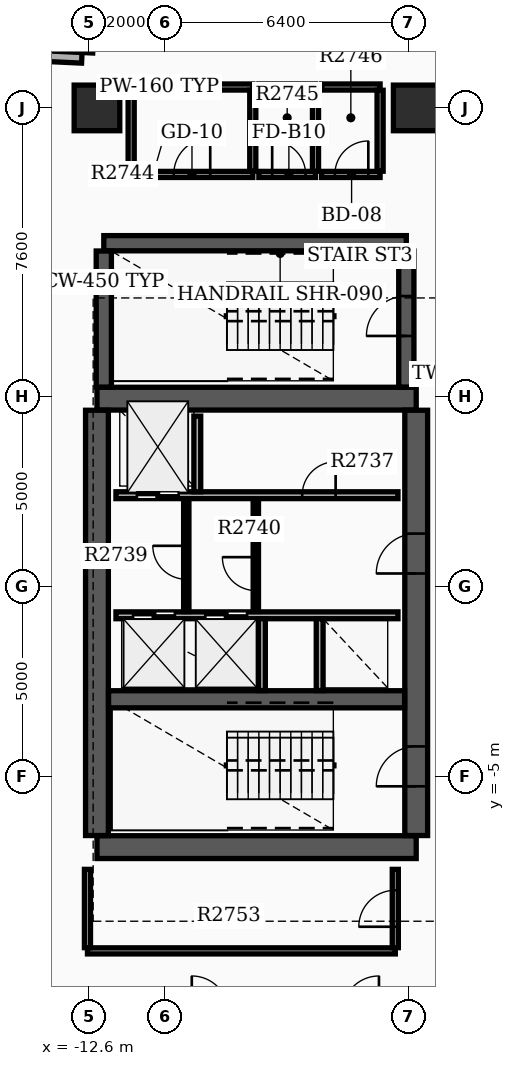
"""IFC4 building model, lengths in metres.
Left out: names, types, materials, properties, quantities, classifications, styles, units other than length and angle.
Written with IfcOpenShell. Run it as: python <this file> out.ifc"""

import sys

from ifc_helpers import new_model, si_unit, direction, frame, frame_2d, origin, origin_2d, place, context, subcontext, project, spatial, rectangle, extrude, element, fill, save


model = new_model("IFC4")
c1 = context("Model", 3, precision=1e-05, world=origin(), true_north=direction((0.0, 1.0)))
c2 = subcontext(c1, "Body", "Model", "MODEL_VIEW")
j1 = project(units=[si_unit("LENGTHUNIT", "METRE"), si_unit("PLANEANGLEUNIT", "RADIAN")], contexts=[c1])
p1 = place(None, origin())
s1 = spatial("IfcSite", under=j1, at=p1, CompositionType="ELEMENT")
p2 = place(p1, origin())
s2 = spatial("IfcBuilding", under=s1, at=p2, CompositionType="ELEMENT")
p3 = place(p2, frame((0.0, 0.0, 172.2)))
s3 = spatial("IfcBuildingStorey", under=s2, at=p3, CompositionType="ELEMENT", Elevation=172.2)
for number, where, z_axis, x_axis in (
    (1, (-12.4, -6.85, 0.0), (0.0, 0.0, 1.0), (1.0, 0.0, 0.0)),
    (2, (-12.4, 4.95, 0.0), (0.0, 0.0, 1.0), (1.0, 0.0, 0.0)),
):
    element("IfcWall", number, at=place(p3, frame(where, z_axis=z_axis, x_axis=x_axis)), inside=s3, PredefinedType="SHEAR", context=c2, shape_type="SweptSolid", body=[
        extrude(rectangle(XDim=8.4, YDim=0.6, at=frame_2d((4.2, 0.0))), origin(), (0.0, 0.0, 1.0), 3.7),
    ])
p4 = place(p3, frame((-12.4, -6.545, 0.0), z_axis=(0.0, 0.0, 1.0), x_axis=(0.0, 1.0, 0.0)))
e3 = element("IfcWall", 3, at=p4, inside=s3, PredefinedType="SHEAR", context=c2, shape_type="SweptSolid", body=[
    extrude(rectangle(XDim=11.19, YDim=0.6, at=frame_2d((5.595, 0.0))), origin(), (0.0, 0.0, 1.0), 3.7),
])
p5 = place(p3, frame((-4.0, -6.545, 0.0), z_axis=(0.0, 0.0, 1.0), x_axis=(0.0, 1.0, 0.0)))
e4 = element("IfcWall", 4, at=p5, inside=s3, PredefinedType="SHEAR", context=c2, shape_type="SweptSolid", body=[
    extrude(rectangle(XDim=11.19, YDim=0.6, at=frame_2d((5.595, 0.0))), origin(), (0.0, 0.0, 1.0), 3.7),
])
p6 = place(p5, frame((1.295, 0.0, 0.0)))
e5 = element("IfcOpeningElement", 5, at=p6, cuts=e4, PredefinedType="OPENING", context=c2, shape_type="SweptSolid", body=[
    extrude(rectangle(XDim=1.05, YDim=2.15, at=frame_2d((0.525, 1.075))), frame((0.0, 0.31, 0.0), z_axis=(0.0, -1.0, 0.0), x_axis=(1.0, 0.0, 0.0)), (0.0, 0.0, 1.0), 0.62),
])
p7 = place(p5, frame((6.895, 0.0, 0.0)))
e6 = element("IfcOpeningElement", 6, at=p7, cuts=e4, PredefinedType="OPENING", context=c2, shape_type="SweptSolid", body=[
    extrude(rectangle(XDim=1.05, YDim=2.15, at=frame_2d((0.525, 1.075))), frame((0.0, 0.31, 0.0), z_axis=(0.0, -1.0, 0.0), x_axis=(1.0, 0.0, 0.0)), (0.0, 0.0, 1.0), 0.62),
])
p8 = place(p3, frame((-12.095, -2.96, 0.0), z_axis=(0.0, 0.0, 1.0), x_axis=(1.0, 0.0, 0.0)))
e7 = element("IfcWall", 7, at=p8, inside=s3, PredefinedType="SHEAR", context=c2, shape_type="SweptSolid", body=[
    extrude(rectangle(XDim=7.79, YDim=0.45, at=frame_2d((3.895, 0.0))), origin(), (0.0, 0.0, 1.0), 3.7),
])
p9 = place(p3, frame((-12.22, 9.04, 0.0), z_axis=(0.0, 0.0, 1.0), x_axis=(1.0, 0.0, 0.0)))
e8 = element("IfcWall", 8, at=p9, inside=s3, PredefinedType="SHEAR", context=c2, shape_type="SweptSolid", body=[
    extrude(rectangle(XDim=7.96, YDim=0.4, at=frame_2d((3.98, 0.0))), origin(), (0.0, 0.0, 1.0), 3.7),
])
p10 = place(p3, frame((-12.22, 5.255, 0.0), z_axis=(0.0, 0.0, 1.0), x_axis=(0.0, 1.0, 0.0)))
e9 = element("IfcWall", 9, at=p10, inside=s3, PredefinedType="SHEAR", context=c2, shape_type="SweptSolid", body=[
    extrude(rectangle(XDim=3.58, YDim=0.4, at=frame_2d((1.79, 0.0))), origin(), (0.0, 0.0, 1.0), 3.7),
])
p11 = place(p3, frame((-4.26, 5.255, 0.0), z_axis=(0.0, 0.0, 1.0), x_axis=(0.0, 1.0, 0.0)))
e10 = element("IfcWall", 10, at=p11, inside=s3, PredefinedType="SHEAR", context=c2, shape_type="SweptSolid", body=[
    extrude(rectangle(XDim=3.58, YDim=0.4, at=frame_2d((1.79, 0.0))), origin(), (0.0, 0.0, 1.0), 3.7),
])
p12 = place(p11, frame((1.345, 0.0, 0.0)))
e11 = element("IfcOpeningElement", 11, at=p12, cuts=e10, PredefinedType="OPENING", context=c2, shape_type="SweptSolid", body=[
    extrude(rectangle(XDim=1.05, YDim=2.15, at=frame_2d((0.525, 1.075))), frame((0.0, 0.21, 0.0), z_axis=(0.0, -1.0, 0.0), x_axis=(1.0, 0.0, 0.0)), (0.0, 0.0, 1.0), 0.42),
])
for number, where, z_axis, x_axis in (
    (12, (-12.4, 12.6, 0.0), (0.0, 0.0, 1.0), (1.0, 0.0, 0.0)),
    (13, (-4.0, 12.6, 0.0), (0.0, 0.0, 1.0), (1.0, 0.0, 0.0)),
):
    element("IfcColumn", number, at=place(p3, frame(where, z_axis=z_axis, x_axis=x_axis)), inside=s3, PredefinedType="COLUMN", context=c2, shape_type="SweptSolid", body=[
        extrude(rectangle(XDim=1.2, YDim=1.2, at=origin_2d()), origin(), (0.0, 0.0, 1.0), 3.9),
    ])
p13 = place(p3, frame((-14.017, 13.976, 0.0), z_axis=(0.0, 0.0, 1.0), x_axis=(0.998883930236, -0.047232339719, 0.0)))
e14 = element("IfcWall", 14, at=p13, inside=s3, PredefinedType="STANDARD", context=c2, shape_type="SweptSolid", body=[
    extrude(rectangle(XDim=1.22, YDim=0.28, at=frame_2d((0.61, 0.0))), origin(), (0.0, 0.0, 1.0), 2.97),
])
p14 = place(p3, frame((-12.652, 14.052, 0.0), z_axis=(0.0, 0.0, 1.0), x_axis=(0.047039284441, 0.99889304018, 0.0)))
e15 = element("IfcWall", 15, at=p14, inside=s3, PredefinedType="STANDARD", context=c2, shape_type="SweptSolid", body=[
    extrude(rectangle(XDim=1.5, YDim=0.28, at=frame_2d((0.75, 0.0))), origin(), (0.0, 0.0, 1.0), 2.97),
])
p15 = place(p3, frame((-11.9, 2.41, 0.0), z_axis=(0.0, 0.0, 1.0), x_axis=(1.0, 0.0, 0.0)))
e16 = element("IfcWall", 16, at=p15, inside=s3, PredefinedType="SOLIDWALL", context=c2, shape_type="SweptSolid", body=[
    extrude(rectangle(XDim=7.42, YDim=0.18, at=frame_2d((3.71, 0.0))), origin(), (0.0, 0.0, 1.0), 2.96),
])
p16 = place(p15, frame((0.55, 0.0, 0.0)))
e17 = element("IfcOpeningElement", 17, at=p16, cuts=e16, PredefinedType="OPENING", context=c2, shape_type="SweptSolid", body=[
    extrude(rectangle(XDim=1.1, YDim=2.15, at=frame_2d((0.55, 1.075))), frame((0.0, 0.1, 0.0), z_axis=(0.0, -1.0, 0.0), x_axis=(1.0, 0.0, 0.0)), (0.0, 0.0, 1.0), 0.2),
])
p17 = place(p15, frame((4.9, 0.0, 0.0)))
e18 = element("IfcOpeningElement", 18, at=p17, cuts=e16, PredefinedType="OPENING", context=c2, shape_type="SweptSolid", body=[
    extrude(rectangle(XDim=0.88, YDim=2.1, at=frame_2d((0.44, 1.05))), frame((0.0, 0.1, 0.0), z_axis=(0.0, -1.0, 0.0), x_axis=(1.0, 0.0, 0.0)), (0.0, 0.0, 1.0), 0.2),
])
p18 = place(p3, frame((-11.9, -0.75, 0.0), z_axis=(0.0, 0.0, 1.0), x_axis=(1.0, 0.0, 0.0)))
e19 = element("IfcWall", 19, at=p18, inside=s3, PredefinedType="SOLIDWALL", context=c2, shape_type="SweptSolid", body=[
    extrude(rectangle(XDim=7.42, YDim=0.18, at=frame_2d((3.71, 0.0))), origin(), (0.0, 0.0, 1.0), 2.96),
])
p19 = place(p18, frame((0.45, 0.0, 0.0)))
e20 = element("IfcOpeningElement", 20, at=p19, cuts=e19, PredefinedType="OPENING", context=c2, shape_type="SweptSolid", body=[
    extrude(rectangle(XDim=1.1, YDim=2.15, at=frame_2d((0.55, 1.075))), frame((0.0, 0.1, 0.0), z_axis=(0.0, -1.0, 0.0), x_axis=(1.0, 0.0, 0.0)), (0.0, 0.0, 1.0), 0.2),
])
p20 = place(p18, frame((2.35, 0.0, 0.0)))
e21 = element("IfcOpeningElement", 21, at=p20, cuts=e19, PredefinedType="OPENING", context=c2, shape_type="SweptSolid", body=[
    extrude(rectangle(XDim=1.1, YDim=2.15, at=frame_2d((0.55, 1.075))), frame((0.0, 0.1, 0.0), z_axis=(0.0, -1.0, 0.0), x_axis=(1.0, 0.0, 0.0)), (0.0, 0.0, 1.0), 0.2),
])
p21 = place(p3, frame((-9.76, 2.5, 0.0), z_axis=(0.0, 0.0, 1.0), x_axis=(0.0, 1.0, 0.0)))
e22 = element("IfcWall", 22, at=p21, inside=s3, PredefinedType="SOLIDWALL", context=c2, shape_type="SweptSolid", body=[
    extrude(rectangle(XDim=1.99, YDim=0.18, at=frame_2d((0.995, 0.0))), origin(), (0.0, 0.0, 1.0), 2.96),
])
for number, where, z_axis, x_axis in (
    (23, (-8.06, -2.73, 0.0), (0.0, 0.0, 1.0), (0.0, 1.0, 0.0)),
    (24, (-6.54, -2.73, 0.0), (0.0, 0.0, 1.0), (0.0, 1.0, 0.0)),
):
    element("IfcWall", number, at=place(p3, frame(where, z_axis=z_axis, x_axis=x_axis)), inside=s3, PredefinedType="SOLIDWALL", context=c2, shape_type="SweptSolid", body=[
        extrude(rectangle(XDim=1.89, YDim=0.18, at=frame_2d((0.945, 0.0))), origin(), (0.0, 0.0, 1.0), 2.96),
    ])
p22 = place(p3, frame((-8.22, -0.65, 0.0), z_axis=(0.0, 0.0, 1.0), x_axis=(0.0, 1.0, 0.0)))
e25 = element("IfcWall", 25, at=p22, inside=s3, PredefinedType="SOLIDWALL", context=c2, shape_type="SweptSolid", body=[
    extrude(rectangle(XDim=2.96, YDim=0.14, at=frame_2d((1.48, 0.0))), origin(), (0.0, 0.0, 1.0), 2.96),
])
p23 = place(p22, frame((0.55, 0.0, 0.0)))
e26 = element("IfcOpeningElement", 26, at=p23, cuts=e25, PredefinedType="OPENING", context=c2, shape_type="SweptSolid", body=[
    extrude(rectangle(XDim=0.88, YDim=2.1, at=frame_2d((0.44, 1.05))), frame((0.0, 0.08, 0.0), z_axis=(0.0, -1.0, 0.0), x_axis=(1.0, 0.0, 0.0)), (0.0, 0.0, 1.0), 0.16),
])
p24 = place(p3, frame((-10.05, -0.652, 0.0), z_axis=(0.0, 0.0, 1.0), x_axis=(0.0, 1.0, 0.0)))
e27 = element("IfcWall", 27, at=p24, inside=s3, PredefinedType="PARTITIONING", context=c2, shape_type="SweptSolid", body=[
    extrude(rectangle(XDim=2.962, YDim=0.14, at=frame_2d((1.481, 0.0))), origin(), (0.0, 0.0, 1.0), 2.96),
])
p25 = place(p24, frame((0.85, 0.0, 0.0)))
e28 = element("IfcOpeningElement", 28, at=p25, cuts=e27, PredefinedType="OPENING", context=c2, shape_type="SweptSolid", body=[
    extrude(rectangle(XDim=0.88, YDim=2.1, at=frame_2d((0.44, 1.05))), frame((0.0, 0.08, 0.0), z_axis=(0.0, -1.0, 0.0), x_axis=(1.0, 0.0, 0.0)), (0.0, 0.0, 1.0), 0.16),
])
p26 = place(p3, frame((-11.5, 10.85, 0.0), z_axis=(0.0, 0.0, 1.0), x_axis=(1.0, 0.0, 0.0)))
e29 = element("IfcWall", 29, at=p26, inside=s3, PredefinedType="PARTITIONING", context=c2, shape_type="SweptSolid", body=[
    extrude(rectangle(XDim=3.2, YDim=0.16, at=frame_2d((1.6, 0.0))), origin(), (0.0, 0.0, 1.0), 2.96),
])
p27 = place(p26, frame((1.12, 0.0, 0.0)))
e30 = element("IfcOpeningElement", 30, at=p27, cuts=e29, PredefinedType="OPENING", context=c2, shape_type="SweptSolid", body=[
    extrude(rectangle(XDim=0.96, YDim=2.15, at=frame_2d((0.48, 1.075))), frame((0.0, 0.09, 0.0), z_axis=(0.0, -1.0, 0.0), x_axis=(1.0, 0.0, 0.0)), (0.0, 0.0, 1.0), 0.18),
])
p28 = place(p3, frame((-11.5, 13.15, 0.0), z_axis=(0.0, 0.0, 1.0), x_axis=(1.0, 0.0, 0.0)))
e31 = element("IfcWall", 31, at=p28, inside=s3, PredefinedType="PARTITIONING", context=c2, shape_type="SweptSolid", body=[
    extrude(rectangle(XDim=3.2, YDim=0.16, at=frame_2d((1.6, 0.0))), origin(), (0.0, 0.0, 1.0), 2.96),
])
for number, where, z_axis, x_axis in (
    (32, (-11.5, 10.935, 0.0), (0.0, 0.0, 1.0), (0.0, 1.0, 0.0)),
    (33, (-8.3, 10.935, 0.0), (0.0, 0.0, 1.0), (0.0, 1.0, 0.0)),
):
    element("IfcWall", number, at=place(p3, frame(where, z_axis=z_axis, x_axis=x_axis)), inside=s3, PredefinedType="PARTITIONING", context=c2, shape_type="SweptSolid", body=[
        extrude(rectangle(XDim=2.13, YDim=0.16, at=frame_2d((1.065, 0.0))), origin(), (0.0, 0.0, 1.0), 2.96),
    ])
p29 = place(p3, frame((-8.14, 10.85, 0.0), z_axis=(0.0, 0.0, 1.0), x_axis=(1.0, 0.0, 0.0)))
e34 = element("IfcWall", 34, at=p29, inside=s3, PredefinedType="PARTITIONING", context=c2, shape_type="SweptSolid", body=[
    extrude(rectangle(XDim=1.49, YDim=0.16, at=frame_2d((0.745, 0.0))), origin(), (0.0, 0.0, 1.0), 2.96),
])
p30 = place(p29, frame((0.35, 0.0, 0.0)))
e35 = element("IfcOpeningElement", 35, at=p30, cuts=e34, PredefinedType="OPENING", context=c2, shape_type="SweptSolid", body=[
    extrude(rectangle(XDim=0.88, YDim=2.1, at=frame_2d((0.44, 1.05))), frame((0.0, 0.09, 0.0), z_axis=(0.0, -1.0, 0.0), x_axis=(1.0, 0.0, 0.0)), (0.0, 0.0, 1.0), 0.18),
])
p31 = place(p3, frame((-8.14, 13.15, 0.0), z_axis=(0.0, 0.0, 1.0), x_axis=(1.0, 0.0, 0.0)))
e36 = element("IfcWall", 36, at=p31, inside=s3, PredefinedType="PARTITIONING", context=c2, shape_type="SweptSolid", body=[
    extrude(rectangle(XDim=1.49, YDim=0.16, at=frame_2d((0.745, 0.0))), origin(), (0.0, 0.0, 1.0), 2.96),
])
p32 = place(p3, frame((-6.65, 10.935, 0.0), z_axis=(0.0, 0.0, 1.0), x_axis=(0.0, 1.0, 0.0)))
e37 = element("IfcWall", 37, at=p32, inside=s3, PredefinedType="PARTITIONING", context=c2, shape_type="SweptSolid", body=[
    extrude(rectangle(XDim=2.13, YDim=0.16, at=frame_2d((1.065, 0.0))), origin(), (0.0, 0.0, 1.0), 2.96),
])
p33 = place(p3, frame((-6.49, 10.85, 0.0), z_axis=(0.0, 0.0, 1.0), x_axis=(1.0, 0.0, 0.0)))
e38 = element("IfcWall", 38, at=p33, inside=s3, PredefinedType="PARTITIONING", context=c2, shape_type="SweptSolid", body=[
    extrude(rectangle(XDim=1.54, YDim=0.16, at=frame_2d((0.77, 0.0))), origin(), (0.0, 0.0, 1.0), 2.96),
])
p34 = place(p33, frame((0.35, 0.0, 0.0)))
e39 = element("IfcOpeningElement", 39, at=p34, cuts=e38, PredefinedType="OPENING", context=c2, shape_type="SweptSolid", body=[
    extrude(rectangle(XDim=0.88, YDim=2.15, at=frame_2d((0.44, 1.075))), frame((0.0, 0.09, 0.0), z_axis=(0.0, -1.0, 0.0), x_axis=(1.0, 0.0, 0.0)), (0.0, 0.0, 1.0), 0.18),
])
p35 = place(p3, frame((-6.49, 13.15, 0.0), z_axis=(0.0, 0.0, 1.0), x_axis=(1.0, 0.0, 0.0)))
e40 = element("IfcWall", 40, at=p35, inside=s3, PredefinedType="PARTITIONING", context=c2, shape_type="SweptSolid", body=[
    extrude(rectangle(XDim=1.54, YDim=0.16, at=frame_2d((0.77, 0.0))), origin(), (0.0, 0.0, 1.0), 2.96),
])
p36 = place(p3, frame((-4.95, 10.935, 0.0), z_axis=(0.0, 0.0, 1.0), x_axis=(0.0, 1.0, 0.0)))
e41 = element("IfcWall", 41, at=p36, inside=s3, PredefinedType="PARTITIONING", context=c2, shape_type="SweptSolid", body=[
    extrude(rectangle(XDim=2.13, YDim=0.16, at=frame_2d((1.065, 0.0))), origin(), (0.0, 0.0, 1.0), 2.96),
])
p37 = place(p3, frame((-12.65, -9.58, 0.0), z_axis=(0.0, 0.0, 1.0), x_axis=(1.0, 0.0, 0.0)))
e42 = element("IfcWall", 42, at=p37, inside=s3, PredefinedType="PARTITIONING", context=c2, shape_type="SweptSolid", body=[
    extrude(rectangle(XDim=8.1, YDim=0.16, at=frame_2d((4.05, 0.0))), origin(), (0.0, 0.0, 1.0), 2.96),
])
p38 = place(p3, frame((-12.65, -9.495, 0.0), z_axis=(0.0, 0.0, 1.0), x_axis=(0.0, 1.0, 0.0)))
e43 = element("IfcWall", 43, at=p38, inside=s3, PredefinedType="PARTITIONING", context=c2, shape_type="SweptSolid", body=[
    extrude(rectangle(XDim=2.06, YDim=0.16, at=frame_2d((1.03, 0.0))), origin(), (0.0, 0.0, 1.0), 2.96),
])
p39 = place(p3, frame((-4.55, -9.495, 0.0), z_axis=(0.0, 0.0, 1.0), x_axis=(0.0, 1.0, 0.0)))
e44 = element("IfcWall", 44, at=p39, inside=s3, PredefinedType="PARTITIONING", context=c2, shape_type="SweptSolid", body=[
    extrude(rectangle(XDim=2.06, YDim=0.16, at=frame_2d((1.03, 0.0))), origin(), (0.0, 0.0, 1.0), 2.96),
])
p40 = place(p39, frame((0.55, 0.0, 0.0)))
e45 = element("IfcOpeningElement", 45, at=p40, cuts=e44, PredefinedType="OPENING", context=c2, shape_type="SweptSolid", body=[
    extrude(rectangle(XDim=0.96, YDim=2.15, at=frame_2d((0.48, 1.075))), frame((0.0, 0.09, 0.0), z_axis=(0.0, -1.0, 0.0), x_axis=(1.0, 0.0, 0.0)), (0.0, 0.0, 1.0), 0.18),
])
p41 = place(p6, origin())
e46 = element("IfcDoor", 46, at=p41, inside=s3, OperationType="SINGLE_SWING_LEFT", PredefinedType="DOOR", context=c2, shape_type="SweptSolid", body=[
    extrude(rectangle(XDim=1.05, YDim=2.15, at=frame_2d((0.525, 1.075))), frame((0.0, 0.025, 0.0), z_axis=(0.0, -1.0, 0.0), x_axis=(1.0, 0.0, 0.0)), (0.0, 0.0, 1.0), 0.05),
])
fill(e5, e46)
p42 = place(p7, origin())
e47 = element("IfcDoor", 47, at=p42, inside=s3, OperationType="SINGLE_SWING_LEFT", PredefinedType="DOOR", context=c2, shape_type="SweptSolid", body=[
    extrude(rectangle(XDim=1.05, YDim=2.15, at=frame_2d((0.525, 1.075))), frame((0.0, 0.025, 0.0), z_axis=(0.0, -1.0, 0.0), x_axis=(1.0, 0.0, 0.0)), (0.0, 0.0, 1.0), 0.05),
])
fill(e6, e47)
p43 = place(p12, origin())
e48 = element("IfcDoor", 48, at=p43, inside=s3, OperationType="SINGLE_SWING_LEFT", PredefinedType="DOOR", context=c2, shape_type="SweptSolid", body=[
    extrude(rectangle(XDim=1.05, YDim=2.15, at=frame_2d((0.525, 1.075))), frame((0.0, 0.025, 0.0), z_axis=(0.0, -1.0, 0.0), x_axis=(1.0, 0.0, 0.0)), (0.0, 0.0, 1.0), 0.05),
])
fill(e11, e48)
p44 = place(p16, origin())
e49 = element("IfcDoor", 49, at=p44, inside=s3, OperationType="DOUBLE_DOOR_SLIDING", PredefinedType="DOOR", context=c2, shape_type="SweptSolid", body=[
    extrude(rectangle(XDim=1.1, YDim=2.15, at=frame_2d((0.55, 1.075))), frame((0.0, 0.025, 0.0), z_axis=(0.0, -1.0, 0.0), x_axis=(1.0, 0.0, 0.0)), (0.0, 0.0, 1.0), 0.05),
])
fill(e17, e49)
p45 = place(p19, origin())
e50 = element("IfcDoor", 50, at=p45, inside=s3, OperationType="DOUBLE_DOOR_SLIDING", PredefinedType="DOOR", context=c2, shape_type="SweptSolid", body=[
    extrude(rectangle(XDim=1.1, YDim=2.15, at=frame_2d((0.55, 1.075))), frame((0.0, 0.025, 0.0), z_axis=(0.0, -1.0, 0.0), x_axis=(1.0, 0.0, 0.0)), (0.0, 0.0, 1.0), 0.05),
])
fill(e20, e50)
p46 = place(p20, origin())
e51 = element("IfcDoor", 51, at=p46, inside=s3, OperationType="DOUBLE_DOOR_SLIDING", PredefinedType="DOOR", context=c2, shape_type="SweptSolid", body=[
    extrude(rectangle(XDim=1.1, YDim=2.15, at=frame_2d((0.55, 1.075))), frame((0.0, 0.025, 0.0), z_axis=(0.0, -1.0, 0.0), x_axis=(1.0, 0.0, 0.0)), (0.0, 0.0, 1.0), 0.05),
])
fill(e21, e51)
p47 = place(p17, origin())
e52 = element("IfcDoor", 52, at=p47, inside=s3, OperationType="SINGLE_SWING_RIGHT", PredefinedType="DOOR", context=c2, shape_type="SweptSolid", body=[
    extrude(rectangle(XDim=0.88, YDim=2.1, at=frame_2d((0.44, 1.05))), frame((0.0, 0.025, 0.0), z_axis=(0.0, -1.0, 0.0), x_axis=(1.0, 0.0, 0.0)), (0.0, 0.0, 1.0), 0.05),
])
fill(e18, e52)
p48 = place(p23, origin())
e53 = element("IfcDoor", 53, at=p48, inside=s3, OperationType="SINGLE_SWING_RIGHT", PredefinedType="DOOR", context=c2, shape_type="SweptSolid", body=[
    extrude(rectangle(XDim=0.88, YDim=2.1, at=frame_2d((0.44, 1.05))), frame((0.0, 0.025, 0.0), z_axis=(0.0, -1.0, 0.0), x_axis=(1.0, 0.0, 0.0)), (0.0, 0.0, 1.0), 0.05),
])
fill(e26, e53)
p49 = place(p25, origin())
e54 = element("IfcDoor", 54, at=p49, inside=s3, OperationType="SINGLE_SWING_RIGHT", PredefinedType="DOOR", context=c2, shape_type="SweptSolid", body=[
    extrude(rectangle(XDim=0.88, YDim=2.1, at=frame_2d((0.44, 1.05))), frame((0.0, 0.025, 0.0), z_axis=(0.0, -1.0, 0.0), x_axis=(1.0, 0.0, 0.0)), (0.0, 0.0, 1.0), 0.05),
])
fill(e28, e54)
p50 = place(p27, origin())
e55 = element("IfcDoor", 55, at=p50, inside=s3, OperationType="SINGLE_SWING_RIGHT", PredefinedType="DOOR", context=c2, shape_type="SweptSolid", body=[
    extrude(rectangle(XDim=0.96, YDim=2.15, at=frame_2d((0.48, 1.075))), frame((0.0, 0.025, 0.0), z_axis=(0.0, -1.0, 0.0), x_axis=(1.0, 0.0, 0.0)), (0.0, 0.0, 1.0), 0.05),
])
fill(e30, e55)
p51 = place(p30, origin())
e56 = element("IfcDoor", 56, at=p51, inside=s3, OperationType="SINGLE_SWING_LEFT", PredefinedType="DOOR", context=c2, shape_type="SweptSolid", body=[
    extrude(rectangle(XDim=0.88, YDim=2.1, at=frame_2d((0.44, 1.05))), frame((0.0, 0.025, 0.0), z_axis=(0.0, -1.0, 0.0), x_axis=(1.0, 0.0, 0.0)), (0.0, 0.0, 1.0), 0.05),
])
fill(e35, e56)
p52 = place(p34, origin())
e57 = element("IfcDoor", 57, at=p52, inside=s3, OperationType="SINGLE_SWING_RIGHT", PredefinedType="DOOR", context=c2, shape_type="SweptSolid", body=[
    extrude(rectangle(XDim=0.88, YDim=2.15, at=frame_2d((0.44, 1.075))), frame((0.0, 0.025, 0.0), z_axis=(0.0, -1.0, 0.0), x_axis=(1.0, 0.0, 0.0)), (0.0, 0.0, 1.0), 0.05),
])
fill(e39, e57)
p53 = place(p40, origin())
e58 = element("IfcDoor", 58, at=p53, inside=s3, OperationType="SINGLE_SWING_LEFT", PredefinedType="DOOR", context=c2, shape_type="SweptSolid", body=[
    extrude(rectangle(XDim=0.96, YDim=2.15, at=frame_2d((0.48, 1.075))), frame((0.0, 0.025, 0.0), z_axis=(0.0, -1.0, 0.0), x_axis=(1.0, 0.0, 0.0)), (0.0, 0.0, 1.0), 0.05),
])
fill(e45, e58)
save(model, sys.argv[1])
